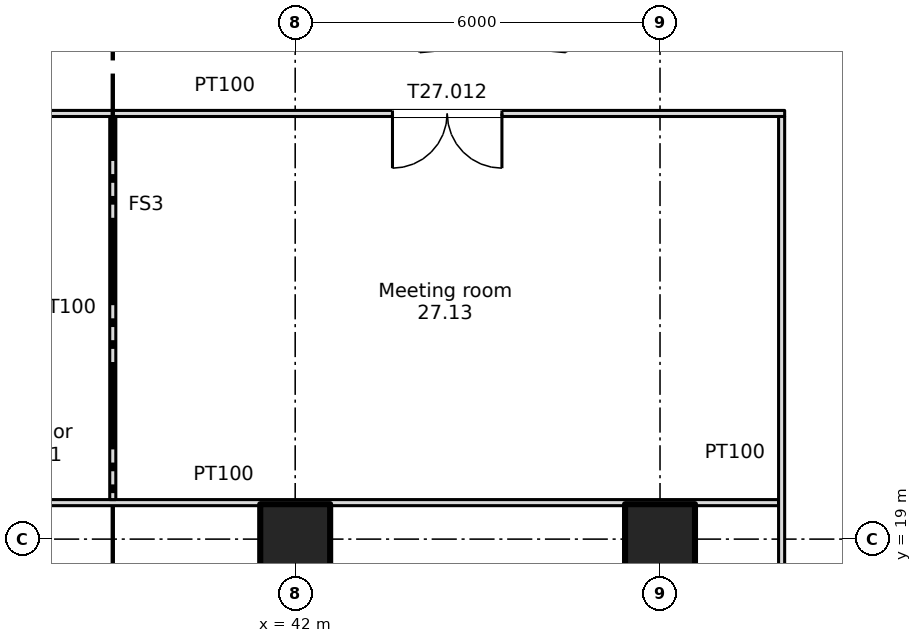
"""IFC4 building model, lengths in metres.
Left out: names, types, materials, properties, quantities, classifications, styles, units other than length and angle.
Written with IfcOpenShell. Run it as: python <this file> out.ifc"""

import sys

from ifc_helpers import new_model, si_unit, direction, frame, frame_2d, origin, origin_2d, place, context, subcontext, project, spatial, rectangle, extrude, element, fill, save


model = new_model("IFC4")
c1 = context("Model", 3, precision=1e-05, world=origin(), true_north=direction((0.0, 1.0)))
c2 = subcontext(c1, "Body", "Model", "MODEL_VIEW")
j1 = project(units=[si_unit("LENGTHUNIT", "METRE"), si_unit("PLANEANGLEUNIT", "RADIAN")], contexts=[c1])
p1 = place(None, origin())
s1 = spatial("IfcSite", under=j1, at=p1, CompositionType="ELEMENT")
p2 = place(p1, origin())
s2 = spatial("IfcBuilding", under=s1, at=p2, CompositionType="ELEMENT")
p3 = place(p2, frame((0.0, 0.0, 185.5)))
s3 = spatial("IfcBuildingStorey", under=s2, at=p3, CompositionType="ELEMENT", Elevation=185.5)
for number, where, z_axis, x_axis in (
    (1, (42.0, 19.0, 0.0), (0.0, 0.0, 1.0), (1.0, 0.0, 0.0)),
    (2, (48.0, 19.0, 0.0), (0.0, 0.0, 1.0), (1.0, 0.0, 0.0)),
):
    element("IfcColumn", number, at=place(p3, frame(where, z_axis=z_axis, x_axis=x_axis)), inside=s3, PredefinedType="COLUMN", context=c2, shape_type="SweptSolid", body=[
        extrude(rectangle(XDim=1.15, YDim=1.15, at=origin_2d()), origin(), (0.0, 0.0, 1.0), 3.35),
    ])
p4 = place(p3, frame((28.05, 19.6, 0.0), z_axis=(0.0, 0.0, 1.0), x_axis=(1.0, 0.0, 0.0)))
e3 = element("IfcWall", 3, at=p4, inside=s3, PredefinedType="PARTITIONING", context=c2, shape_type="SweptSolid", body=[
    extrude(rectangle(XDim=21.9, YDim=0.1, at=frame_2d((10.95, 0.0))), origin(), (0.0, 0.0, 1.0), 3.35),
])
p5 = place(p3, frame((27.95, 26.0, 0.0), z_axis=(0.0, 0.0, 1.0), x_axis=(1.0, 0.0, 0.0)))
e4 = element("IfcWall", 4, at=p5, inside=s3, PredefinedType="PARTITIONING", context=c2, shape_type="SweptSolid", body=[
    extrude(rectangle(XDim=22.1, YDim=0.1, at=frame_2d((11.05, 0.0))), origin(), (0.0, 0.0, 1.0), 3.35),
])
p6 = place(p5, frame((4.65, 0.0, 0.0)))
e5 = element("IfcOpeningElement", 5, at=p6, cuts=e4, PredefinedType="OPENING", context=c2, shape_type="SweptSolid", body=[
    extrude(rectangle(XDim=1.8, YDim=2.1, at=frame_2d((0.9, 1.05))), frame((0.0, 0.06, 0.0), z_axis=(0.0, -1.0, 0.0), x_axis=(1.0, 0.0, 0.0)), (0.0, 0.0, 1.0), 0.12),
])
p7 = place(p5, frame((15.65, 0.0, 0.0)))
e6 = element("IfcOpeningElement", 6, at=p7, cuts=e4, PredefinedType="OPENING", context=c2, shape_type="SweptSolid", body=[
    extrude(rectangle(XDim=1.8, YDim=2.1, at=frame_2d((0.9, 1.05))), frame((0.0, 0.06, 0.0), z_axis=(0.0, -1.0, 0.0), x_axis=(1.0, 0.0, 0.0)), (0.0, 0.0, 1.0), 0.12),
])
p8 = place(p3, frame((39.0, 19.65, 0.0), z_axis=(0.0, 0.0, 1.0), x_axis=(0.0, 1.0, 0.0)))
e7 = element("IfcWall", 7, at=p8, inside=s3, PredefinedType="PARTITIONING", context=c2, shape_type="SweptSolid", body=[
    extrude(rectangle(XDim=6.3, YDim=0.1, at=frame_2d((3.15, 0.0))), origin(), (0.0, 0.0, 1.0), 3.35),
])
p9 = place(p3, frame((50.0, 12.65, 0.0), z_axis=(0.0, 0.0, 1.0), x_axis=(0.0, 1.0, 0.0)))
e8 = element("IfcWall", 8, at=p9, inside=s3, PredefinedType="PARTITIONING", context=c2, shape_type="SweptSolid", body=[
    extrude(rectangle(XDim=13.3, YDim=0.1, at=frame_2d((6.65, 0.0))), origin(), (0.0, 0.0, 1.0), 3.35),
])
p10 = place(p7, origin())
e9 = element("IfcDoor", 9, at=p10, inside=s3, OperationType="DOUBLE_DOOR_SINGLE_SWING", PredefinedType="DOOR", context=c2, shape_type="SweptSolid", body=[
    extrude(rectangle(XDim=1.8, YDim=2.1, at=frame_2d((0.9, 1.05))), frame((0.0, 0.025, 0.0), z_axis=(0.0, -1.0, 0.0), x_axis=(1.0, 0.0, 0.0)), (0.0, 0.0, 1.0), 0.05),
])
fill(e6, e9)
save(model, sys.argv[1])
